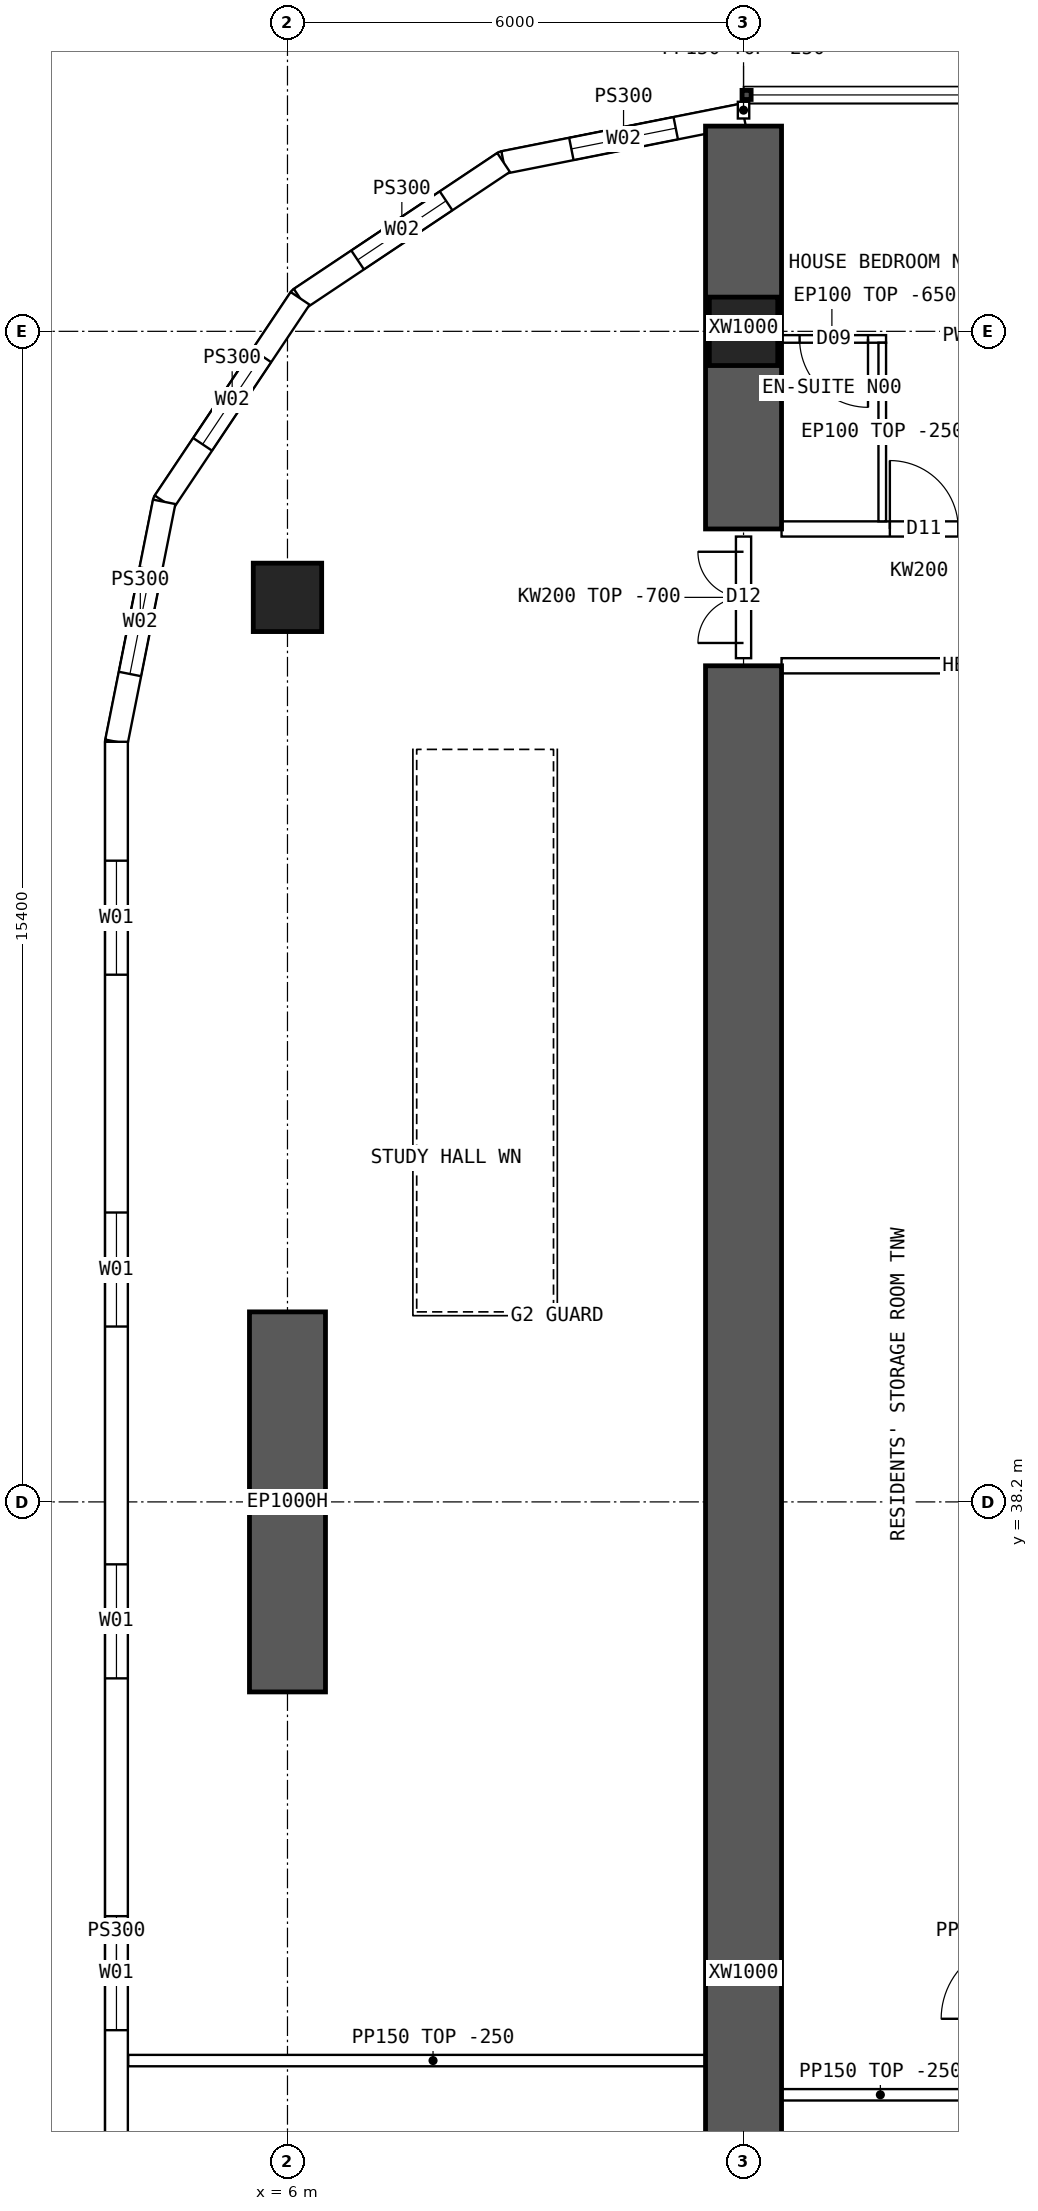
"""IFC4 building model, lengths in metres.
Left out: names, types, materials, properties, quantities, classifications, styles, units other than length and angle.
Written with IfcOpenShell. Run it as: python <this file> out.ifc"""

import sys

from ifc_helpers import new_model, si_unit, direction, frame, frame_2d, origin, origin_2d, place, context, subcontext, project, spatial, polyline, rectangle, hollow_rectangle, outline, extrude, element, fill, save


model = new_model("IFC4")
c1 = context("Model", 3, precision=1e-05, world=origin(), true_north=direction((0.0, 1.0)))
c2 = subcontext(c1, "Body", "Model", "MODEL_VIEW")
j1 = project(units=[si_unit("LENGTHUNIT", "METRE"), si_unit("PLANEANGLEUNIT", "RADIAN")], contexts=[c1])
p1 = place(None, origin())
s1 = spatial("IfcSite", under=j1, at=p1, CompositionType="ELEMENT")
p2 = place(p1, origin())
s2 = spatial("IfcBuilding", under=s1, at=p2, CompositionType="ELEMENT")
p3 = place(p2, frame((0.0, 0.0, 27.7)))
s3 = spatial("IfcBuildingStorey", under=s2, at=p3, CompositionType="ELEMENT", Elevation=27.7)
for number, where, z_axis, x_axis in (
    (1, (12.0, 53.6, 0.0), (0.0, 0.0, 1.0), (1.0, 0.0, 0.0)),
    (2, (6.0, 50.1, 0.0), (0.0, 0.0, 1.0), (1.0, 0.0, 0.0)),
):
    element("IfcColumn", number, at=place(p3, frame(where, z_axis=z_axis, x_axis=x_axis)), inside=s3, PredefinedType="COLUMN", context=c2, shape_type="SweptSolid", body=[
        extrude(hollow_rectangle(XDim=0.9, YDim=0.9, WallThickness=0.09, at=origin_2d()), origin(), (0.0, 0.0, 1.0), 3.75),
    ])
p4 = place(p3, frame((6.0, 35.7, 0.0), z_axis=(0.0, 0.0, 1.0), x_axis=(0.0, 1.0, 0.0)))
e3 = element("IfcWall", 3, at=p4, inside=s3, PredefinedType="SHEAR", context=c2, shape_type="SweptSolid", body=[
    extrude(rectangle(XDim=5.0, YDim=1.0, at=frame_2d((2.5, 0.0))), origin(), (0.0, 0.0, 1.0), 3.75),
])
p5 = place(p3, frame((12.0, 51.0, 0.0), z_axis=(0.0, 0.0, 1.0), x_axis=(0.0, 1.0, 0.0)))
e4 = element("IfcWall", 4, at=p5, inside=s3, PredefinedType="SHEAR", context=c2, shape_type="SweptSolid", body=[
    extrude(rectangle(XDim=5.3, YDim=1.0, at=frame_2d((2.65, 0.0))), origin(), (0.0, 0.0, 1.0), 3.75),
])
p6 = place(p3, frame((12.0, 14.8, 0.0), z_axis=(0.0, 0.0, 1.0), x_axis=(0.0, 1.0, 0.0)))
e5 = element("IfcWall", 5, at=p6, inside=s3, PredefinedType="SHEAR", context=c2, shape_type="SweptSolid", body=[
    extrude(rectangle(XDim=34.4, YDim=1.0, at=frame_2d((17.2, 0.0))), origin(), (0.0, 0.0, 1.0), 3.75),
])
p7 = place(p3, frame((3.75, 48.2, 0.0), z_axis=(0.0, 0.0, 1.0), x_axis=(0.0, -1.0, 0.0)))
e6 = element("IfcWall", 6, at=p7, inside=s3, PredefinedType="SOLIDWALL", context=c2, shape_type="SweptSolid", body=[
    extrude(outline(polyline([(-0.015, -0.15), (32.415, -0.15), (32.385, 0.15), (0.015, 0.15), (-0.015, -0.15)])), origin(), (0.0, 0.0, 1.0), 3.5),
])
p8 = place(p7, frame((1.564, 0.0, 0.9)))
e7 = element("IfcOpeningElement", 7, at=p8, cuts=e6, PredefinedType="OPENING", context=c2, shape_type="SweptSolid", body=[
    extrude(rectangle(XDim=1.5, YDim=2.0, at=frame_2d((0.75, 1.0))), frame((0.0, 0.16, 0.0), z_axis=(0.0, -1.0, 0.0), x_axis=(1.0, 0.0, 0.0)), (0.0, 0.0, 1.0), 0.32),
])
p9 = place(p7, frame((6.193, 0.0, 0.9)))
e8 = element("IfcOpeningElement", 8, at=p9, cuts=e6, PredefinedType="OPENING", context=c2, shape_type="SweptSolid", body=[
    extrude(rectangle(XDim=1.5, YDim=2.0, at=frame_2d((0.75, 1.0))), frame((0.0, 0.16, 0.0), z_axis=(0.0, -1.0, 0.0), x_axis=(1.0, 0.0, 0.0)), (0.0, 0.0, 1.0), 0.32),
])
p10 = place(p7, frame((10.822, 0.0, 0.9)))
e9 = element("IfcOpeningElement", 9, at=p10, cuts=e6, PredefinedType="OPENING", context=c2, shape_type="SweptSolid", body=[
    extrude(rectangle(XDim=1.5, YDim=2.0, at=frame_2d((0.75, 1.0))), frame((0.0, 0.16, 0.0), z_axis=(0.0, -1.0, 0.0), x_axis=(1.0, 0.0, 0.0)), (0.0, 0.0, 1.0), 0.32),
])
p11 = place(p7, frame((15.45, 0.0, 0.9)))
e10 = element("IfcOpeningElement", 10, at=p11, cuts=e6, PredefinedType="OPENING", context=c2, shape_type="SweptSolid", body=[
    extrude(rectangle(XDim=1.5, YDim=2.0, at=frame_2d((0.75, 1.0))), frame((0.0, 0.16, 0.0), z_axis=(0.0, -1.0, 0.0), x_axis=(1.0, 0.0, 0.0)), (0.0, 0.0, 1.0), 0.32),
])
p12 = place(p7, frame((20.079, 0.0, 0.9)))
e11 = element("IfcOpeningElement", 11, at=p12, cuts=e6, PredefinedType="OPENING", context=c2, shape_type="SweptSolid", body=[
    extrude(rectangle(XDim=1.5, YDim=2.0, at=frame_2d((0.75, 1.0))), frame((0.0, 0.16, 0.0), z_axis=(0.0, -1.0, 0.0), x_axis=(1.0, 0.0, 0.0)), (0.0, 0.0, 1.0), 0.32),
])
p13 = place(p7, frame((24.707, 0.0, 0.9)))
e12 = element("IfcOpeningElement", 12, at=p13, cuts=e6, PredefinedType="OPENING", context=c2, shape_type="SweptSolid", body=[
    extrude(rectangle(XDim=1.5, YDim=2.0, at=frame_2d((0.75, 1.0))), frame((0.0, 0.16, 0.0), z_axis=(0.0, -1.0, 0.0), x_axis=(1.0, 0.0, 0.0)), (0.0, 0.0, 1.0), 0.32),
])
p14 = place(p7, frame((29.336, 0.0, 0.9)))
e13 = element("IfcOpeningElement", 13, at=p14, cuts=e6, PredefinedType="OPENING", context=c2, shape_type="SweptSolid", body=[
    extrude(rectangle(XDim=1.5, YDim=2.0, at=frame_2d((0.75, 1.0))), frame((0.0, 0.16, 0.0), z_axis=(0.0, -1.0, 0.0), x_axis=(1.0, 0.0, 0.0)), (0.0, 0.0, 1.0), 0.32),
])
p15 = place(p3, frame((12.0, 56.45, 0.0), z_axis=(0.0, 0.0, 1.0), x_axis=(-0.980787251524, -0.195080412259, 0.0)))
e14 = element("IfcWall", 14, at=p15, inside=s3, PredefinedType="SOLIDWALL", context=c2, shape_type="SweptSolid", body=[
    extrude(outline(polyline([(-0.03, -0.15), (3.249, -0.15), (3.189, 0.15), (0.03, 0.15), (-0.03, -0.15)])), origin(), (0.0, 0.0, 1.0), 3.5),
])
p16 = place(p15, frame((0.909, 0.0, 0.9)))
e15 = element("IfcOpeningElement", 15, at=p16, cuts=e14, PredefinedType="OPENING", context=c2, shape_type="SweptSolid", body=[
    extrude(rectangle(XDim=1.4, YDim=1.8, at=frame_2d((0.7, 0.9))), frame((0.0, 0.16, 0.0), z_axis=(0.0, -1.0, 0.0), x_axis=(1.0, 0.0, 0.0)), (0.0, 0.0, 1.0), 0.32),
])
p17 = place(p3, frame((8.843, 55.822, 0.0), z_axis=(0.0, 0.0, 1.0), x_axis=(-0.831478105043, -0.555557522525, 0.0)))
e16 = element("IfcWall", 16, at=p17, inside=s3, PredefinedType="SOLIDWALL", context=c2, shape_type="SweptSolid", body=[
    extrude(outline(polyline([(-0.03, -0.15), (3.249, -0.15), (3.189, 0.15), (0.03, 0.15), (-0.03, -0.15)])), origin(), (0.0, 0.0, 1.0), 3.5),
])
p18 = place(p17, frame((0.909, 0.0, 0.9)))
e17 = element("IfcOpeningElement", 17, at=p18, cuts=e16, PredefinedType="OPENING", context=c2, shape_type="SweptSolid", body=[
    extrude(rectangle(XDim=1.4, YDim=1.8, at=frame_2d((0.7, 0.9))), frame((0.0, 0.16, 0.0), z_axis=(0.0, -1.0, 0.0), x_axis=(1.0, 0.0, 0.0)), (0.0, 0.0, 1.0), 0.32),
])
p19 = place(p3, frame((6.167, 54.034, 0.0), z_axis=(0.0, 0.0, 1.0), x_axis=(-0.555609954424, -0.831443069936, 0.0)))
e18 = element("IfcWall", 18, at=p19, inside=s3, PredefinedType="SOLIDWALL", context=c2, shape_type="SweptSolid", body=[
    extrude(outline(polyline([(-0.03, -0.15), (3.249, -0.15), (3.189, 0.15), (0.03, 0.15), (-0.03, -0.15)])), origin(), (0.0, 0.0, 1.0), 3.5),
])
p20 = place(p19, frame((0.909, 0.0, 0.9)))
e19 = element("IfcOpeningElement", 19, at=p20, cuts=e18, PredefinedType="OPENING", context=c2, shape_type="SweptSolid", body=[
    extrude(rectangle(XDim=1.4, YDim=1.8, at=frame_2d((0.7, 0.9))), frame((0.0, 0.16, 0.0), z_axis=(0.0, -1.0, 0.0), x_axis=(1.0, 0.0, 0.0)), (0.0, 0.0, 1.0), 0.32),
])
p21 = place(p3, frame((4.378, 51.357, 0.0), z_axis=(0.0, 0.0, 1.0), x_axis=(-0.195065901187, -0.980790137692, 0.0)))
e20 = element("IfcWall", 20, at=p21, inside=s3, PredefinedType="SOLIDWALL", context=c2, shape_type="SweptSolid", body=[
    extrude(outline(polyline([(-0.03, -0.15), (3.234, -0.15), (3.204, 0.15), (0.03, 0.15), (-0.03, -0.15)])), origin(), (0.0, 0.0, 1.0), 3.5),
])
p22 = place(p21, frame((0.909, 0.0, 0.9)))
e21 = element("IfcOpeningElement", 21, at=p22, cuts=e20, PredefinedType="OPENING", context=c2, shape_type="SweptSolid", body=[
    extrude(rectangle(XDim=1.4, YDim=1.8, at=frame_2d((0.7, 0.9))), frame((0.0, 0.16, 0.0), z_axis=(0.0, -1.0, 0.0), x_axis=(1.0, 0.0, 0.0)), (0.0, 0.0, 1.0), 0.32),
])
p23 = place(p3, frame((12.5, 51.0, 0.0), z_axis=(0.0, 0.0, 1.0), x_axis=(1.0, 0.0, 0.0)))
e22 = element("IfcWall", 22, at=p23, inside=s3, PredefinedType="SOLIDWALL", context=c2, shape_type="SweptSolid", body=[
    extrude(outline(polyline([(0.0, 0.0), (5.0, 0.0), (5.0, 3.1), (0.0, 3.1), (0.0, 0.0)])), frame((0.0, 0.1, 0.0), z_axis=(0.0, -1.0, 0.0), x_axis=(1.0, 0.0, 0.0)), (0.0, 0.0, 1.0), 0.2),
])
p24 = place(p23, frame((1.425, 0.0, 0.0)))
e23 = element("IfcOpeningElement", 23, at=p24, cuts=e22, PredefinedType="OPENING", context=c2, shape_type="SweptSolid", body=[
    extrude(rectangle(XDim=0.9, YDim=2.1, at=frame_2d((0.45, 1.05))), frame((0.0, 0.11, 0.0), z_axis=(0.0, -1.0, 0.0), x_axis=(1.0, 0.0, 0.0)), (0.0, 0.0, 1.0), 0.22),
])
p25 = place(p23, frame((2.675, 0.0, 0.0)))
e24 = element("IfcOpeningElement", 24, at=p25, cuts=e22, PredefinedType="OPENING", context=c2, shape_type="SweptSolid", body=[
    extrude(rectangle(XDim=0.9, YDim=2.1, at=frame_2d((0.45, 1.05))), frame((0.0, 0.11, 0.0), z_axis=(0.0, -1.0, 0.0), x_axis=(1.0, 0.0, 0.0)), (0.0, 0.0, 1.0), 0.22),
])
p26 = place(p3, frame((12.5, 49.2, 0.0), z_axis=(0.0, 0.0, 1.0), x_axis=(1.0, 0.0, 0.0)))
e25 = element("IfcWall", 25, at=p26, inside=s3, PredefinedType="SOLIDWALL", context=c2, shape_type="SweptSolid", body=[
    extrude(rectangle(XDim=5.0, YDim=0.2, at=frame_2d((2.5, 0.0))), origin(), (0.0, 0.0, 1.0), 3.5),
])
p27 = place(p26, frame((3.3, 0.0, 0.0)))
e26 = element("IfcOpeningElement", 26, at=p27, cuts=e25, PredefinedType="OPENING", context=c2, shape_type="SweptSolid", body=[
    extrude(rectangle(XDim=1.6, YDim=2.1, at=frame_2d((0.8, 1.05))), frame((0.0, 0.11, 0.0), z_axis=(0.0, -1.0, 0.0), x_axis=(1.0, 0.0, 0.0)), (0.0, 0.0, 1.0), 0.22),
])
p28 = place(p3, frame((12.45, 53.5, 0.0), z_axis=(0.0, 0.0, 1.0), x_axis=(1.0, 0.0, 0.0)))
e27 = element("IfcWall", 27, at=p28, inside=s3, PredefinedType="PARTITIONING", context=c2, shape_type="SweptSolid", body=[
    extrude(outline(polyline([(0.0, 0.0), (1.425, 0.0), (1.425, 3.1), (0.0, 3.1), (0.0, 0.0)])), frame((0.0, 0.05, 0.0), z_axis=(0.0, -1.0, 0.0), x_axis=(1.0, 0.0, 0.0)), (0.0, 0.0, 1.0), 0.1),
])
p29 = place(p28, frame((0.288, 0.0, 0.0)))
e28 = element("IfcOpeningElement", 28, at=p29, cuts=e27, PredefinedType="OPENING", context=c2, shape_type="SweptSolid", body=[
    extrude(rectangle(XDim=0.9, YDim=2.1, at=frame_2d((0.45, 1.05))), frame((0.0, 0.06, 0.0), z_axis=(0.0, -1.0, 0.0), x_axis=(1.0, 0.0, 0.0)), (0.0, 0.0, 1.0), 0.12),
])
p30 = place(p3, frame((13.825, 53.45, 0.0), z_axis=(0.0, 0.0, 1.0), x_axis=(0.0, -1.0, 0.0)))
e29 = element("IfcWall", 29, at=p30, inside=s3, PredefinedType="PARTITIONING", context=c2, shape_type="SweptSolid", body=[
    extrude(outline(polyline([(0.0, 0.0), (2.35, 0.0), (2.35, 3.1), (2.302, 3.1), (2.3, 3.5), (0.052, 3.5), (0.05, 3.1), (0.0, 3.1), (0.0, 0.0)])), frame((0.0, 0.05, 0.0), z_axis=(0.0, -1.0, 0.0), x_axis=(1.0, 0.0, 0.0)), (0.0, 0.0, 1.0), 0.1),
])
p31 = place(p3, frame((12.0, 30.4, 0.0), z_axis=(0.0, 0.0, 1.0), x_axis=(1.0, 0.0, 0.0)))
e30 = element("IfcWall", 30, at=p31, inside=s3, PredefinedType="PARTITIONING", context=c2, shape_type="SweptSolid", body=[
    extrude(rectangle(XDim=3.6, YDim=0.15, at=frame_2d((1.8, 0.0))), origin(), (0.0, 0.0, 1.0), 3.5),
])
p32 = place(p3, frame((3.905, 30.85, 0.0), z_axis=(0.0, 0.0, 1.0), x_axis=(1.0, 0.0, 0.0)))
e31 = element("IfcWall", 31, at=p32, inside=s3, PredefinedType="PARTITIONING", context=c2, shape_type="SweptSolid", body=[
    extrude(outline(polyline([(0.0, 0.0), (8.02, 0.0), (8.02, 3.5), (2.397, 3.5), (2.395, 3.05), (1.797, 3.05), (1.795, 3.5), (0.0, 3.5), (0.0, 0.0)])), frame((0.0, 0.075, 0.0), z_axis=(0.0, -1.0, 0.0), x_axis=(1.0, 0.0, 0.0)), (0.0, 0.0, 1.0), 0.15),
])
p33 = place(p3, frame((12.0, 49.3, 0.0), z_axis=(0.0, 0.0, 1.0), x_axis=(0.0, 1.0, 0.0)))
e32 = element("IfcWall", 32, at=p33, inside=s3, PredefinedType="SOLIDWALL", context=c2, shape_type="SweptSolid", body=[
    extrude(outline(polyline([(0.0, 0.0), (1.6, 0.0), (1.6, 3.05), (0.0, 3.05), (0.0, 0.0)])), frame((0.0, 0.1, 0.0), z_axis=(0.0, -1.0, 0.0), x_axis=(1.0, 0.0, 0.0)), (0.0, 0.0, 1.0), 0.2),
])
p34 = place(p33, frame((0.2, 0.0, 0.0)))
e33 = element("IfcOpeningElement", 33, at=p34, cuts=e32, PredefinedType="OPENING", context=c2, shape_type="SweptSolid", body=[
    extrude(rectangle(XDim=1.2, YDim=2.1, at=frame_2d((0.6, 1.05))), frame((0.0, 0.11, 0.0), z_axis=(0.0, -1.0, 0.0), x_axis=(1.0, 0.0, 0.0)), (0.0, 0.0, 1.0), 0.22),
])
p35 = place(p3, frame((12.0, 56.4, 0.0), z_axis=(0.0, 0.0, 1.0), x_axis=(0.0, 1.0, 0.0)))
e34 = element("IfcWall", 34, at=p35, inside=s3, PredefinedType="PARTITIONING", context=c2, shape_type="SweptSolid", body=[
    extrude(rectangle(XDim=0.22, YDim=0.15, at=frame_2d((0.11, 0.0))), origin(), (0.0, 0.0, 1.0), 3.5),
])
p36 = place(p8, origin())
e35 = element("IfcWindow", 35, at=p36, inside=s3, PartitioningType="SINGLE_PANEL", PredefinedType="WINDOW", context=c2, shape_type="SweptSolid", body=[
    extrude(rectangle(XDim=1.5, YDim=2.0, at=frame_2d((0.75, 1.0))), frame((0.0, 0.03, 0.0), z_axis=(0.0, -1.0, 0.0), x_axis=(1.0, 0.0, 0.0)), (0.0, 0.0, 1.0), 0.06),
])
fill(e7, e35)
p37 = place(p9, origin())
e36 = element("IfcWindow", 36, at=p37, inside=s3, PartitioningType="SINGLE_PANEL", PredefinedType="WINDOW", context=c2, shape_type="SweptSolid", body=[
    extrude(rectangle(XDim=1.5, YDim=2.0, at=frame_2d((0.75, 1.0))), frame((0.0, 0.03, 0.0), z_axis=(0.0, -1.0, 0.0), x_axis=(1.0, 0.0, 0.0)), (0.0, 0.0, 1.0), 0.06),
])
fill(e8, e36)
p38 = place(p10, origin())
e37 = element("IfcWindow", 37, at=p38, inside=s3, PartitioningType="SINGLE_PANEL", PredefinedType="WINDOW", context=c2, shape_type="SweptSolid", body=[
    extrude(rectangle(XDim=1.5, YDim=2.0, at=frame_2d((0.75, 1.0))), frame((0.0, 0.03, 0.0), z_axis=(0.0, -1.0, 0.0), x_axis=(1.0, 0.0, 0.0)), (0.0, 0.0, 1.0), 0.06),
])
fill(e9, e37)
p39 = place(p11, origin())
e38 = element("IfcWindow", 38, at=p39, inside=s3, PartitioningType="SINGLE_PANEL", PredefinedType="WINDOW", context=c2, shape_type="SweptSolid", body=[
    extrude(rectangle(XDim=1.5, YDim=2.0, at=frame_2d((0.75, 1.0))), frame((0.0, 0.03, 0.0), z_axis=(0.0, -1.0, 0.0), x_axis=(1.0, 0.0, 0.0)), (0.0, 0.0, 1.0), 0.06),
])
fill(e10, e38)
p40 = place(p16, origin())
e39 = element("IfcWindow", 39, at=p40, inside=s3, PartitioningType="SINGLE_PANEL", PredefinedType="WINDOW", context=c2, shape_type="SweptSolid", body=[
    extrude(rectangle(XDim=1.4, YDim=1.8, at=frame_2d((0.7, 0.9))), frame((0.0, 0.03, 0.0), z_axis=(0.0, -1.0, 0.0), x_axis=(1.0, 0.0, 0.0)), (0.0, 0.0, 1.0), 0.06),
])
fill(e15, e39)
p41 = place(p18, origin())
e40 = element("IfcWindow", 40, at=p41, inside=s3, PartitioningType="SINGLE_PANEL", PredefinedType="WINDOW", context=c2, shape_type="SweptSolid", body=[
    extrude(rectangle(XDim=1.4, YDim=1.8, at=frame_2d((0.7, 0.9))), frame((0.0, 0.03, 0.0), z_axis=(0.0, -1.0, 0.0), x_axis=(1.0, 0.0, 0.0)), (0.0, 0.0, 1.0), 0.06),
])
fill(e17, e40)
p42 = place(p20, origin())
e41 = element("IfcWindow", 41, at=p42, inside=s3, PartitioningType="SINGLE_PANEL", PredefinedType="WINDOW", context=c2, shape_type="SweptSolid", body=[
    extrude(rectangle(XDim=1.4, YDim=1.8, at=frame_2d((0.7, 0.9))), frame((0.0, 0.03, 0.0), z_axis=(0.0, -1.0, 0.0), x_axis=(1.0, 0.0, 0.0)), (0.0, 0.0, 1.0), 0.06),
])
fill(e19, e41)
p43 = place(p22, origin())
e42 = element("IfcWindow", 42, at=p43, inside=s3, PartitioningType="SINGLE_PANEL", PredefinedType="WINDOW", context=c2, shape_type="SweptSolid", body=[
    extrude(rectangle(XDim=1.4, YDim=1.8, at=frame_2d((0.7, 0.9))), frame((0.0, 0.03, 0.0), z_axis=(0.0, -1.0, 0.0), x_axis=(1.0, 0.0, 0.0)), (0.0, 0.0, 1.0), 0.06),
])
fill(e21, e42)
p44 = place(p29, origin())
e43 = element("IfcDoor", 43, at=p44, inside=s3, OperationType="SINGLE_SWING_RIGHT", PredefinedType="DOOR", context=c2, shape_type="SweptSolid", body=[
    extrude(rectangle(XDim=0.9, YDim=2.1, at=frame_2d((0.45, 1.05))), frame((0.0, 0.025, 0.0), z_axis=(0.0, -1.0, 0.0), x_axis=(1.0, 0.0, 0.0)), (0.0, 0.0, 1.0), 0.05),
])
fill(e28, e43)
p45 = place(p24, origin())
e44 = element("IfcDoor", 44, at=p45, inside=s3, OperationType="SINGLE_SWING_LEFT", PredefinedType="DOOR", context=c2, shape_type="SweptSolid", body=[
    extrude(rectangle(XDim=0.9, YDim=2.1, at=frame_2d((0.45, 1.05))), frame((0.0, 0.025, 0.0), z_axis=(0.0, -1.0, 0.0), x_axis=(1.0, 0.0, 0.0)), (0.0, 0.0, 1.0), 0.05),
])
fill(e23, e44)
p46 = place(p34, origin())
e45 = element("IfcDoor", 45, at=p46, inside=s3, OperationType="DOUBLE_DOOR_SINGLE_SWING", PredefinedType="DOOR", context=c2, shape_type="SweptSolid", body=[
    extrude(rectangle(XDim=1.2, YDim=2.1, at=frame_2d((0.6, 1.05))), frame((0.0, 0.025, 0.0), z_axis=(0.0, -1.0, 0.0), x_axis=(1.0, 0.0, 0.0)), (0.0, 0.0, 1.0), 0.05),
])
fill(e33, e45)
save(model, sys.argv[1])
